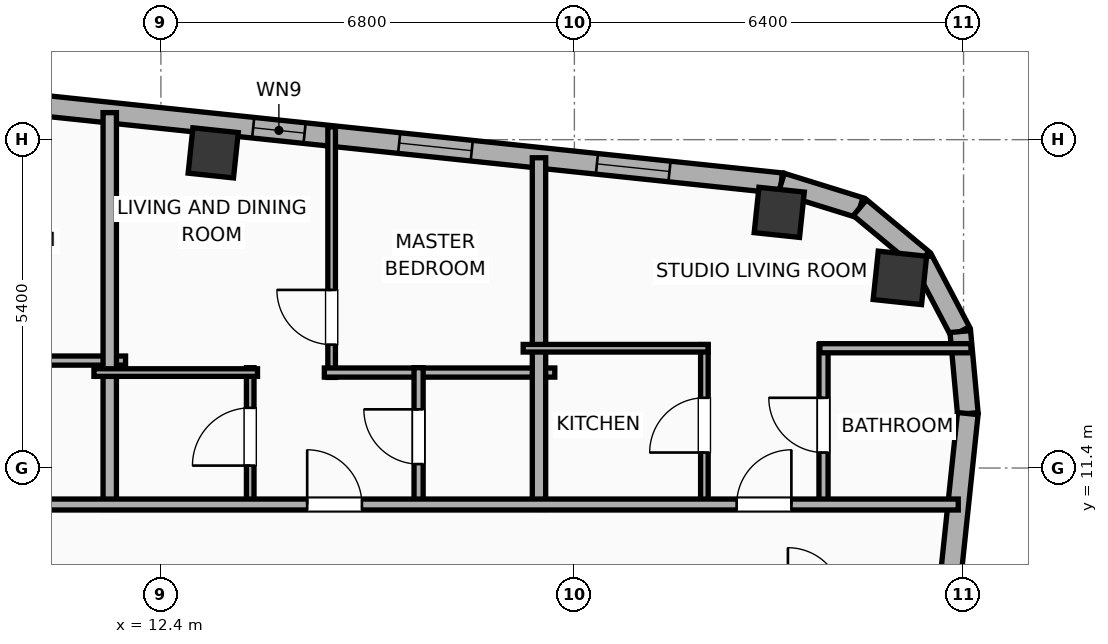
"""IFC4 building model, lengths in metres.
Left out: names, types, materials, properties, quantities, classifications, styles, units other than length and angle.
Written with IfcOpenShell. Run it as: python <this file> out.ifc"""

import sys

from ifc_helpers import new_model, si_unit, direction, frame, frame_2d, origin, origin_2d, place, context, subcontext, project, spatial, rectangle, hollow_rectangle, hollow_circle, extrude, element, fill, save


model = new_model("IFC4")
c1 = context("Model", 3, precision=1e-05, world=origin(), true_north=direction((0.0, 1.0)))
c2 = subcontext(c1, "Body", "Model", "MODEL_VIEW")
j1 = project(units=[si_unit("LENGTHUNIT", "METRE"), si_unit("PLANEANGLEUNIT", "RADIAN")], contexts=[c1])
p1 = place(None, origin())
s1 = spatial("IfcSite", under=j1, at=p1, CompositionType="ELEMENT")
p2 = place(p1, origin())
s2 = spatial("IfcBuilding", under=s1, at=p2, CompositionType="ELEMENT")
p3 = place(p2, frame((0.0, 0.0, 283.4)))
s3 = spatial("IfcBuildingStorey", under=s2, at=p3, CompositionType="ELEMENT", Elevation=283.4)
p4 = place(p3, frame((24.553, 14.527, 0.0), z_axis=(0.0, 0.0, 1.0), x_axis=(0.994521895368, -0.104528463268, 0.0)))
e1 = element("IfcColumn", 1, at=p4, inside=s3, PredefinedType="COLUMN", context=c2, shape_type="SweptSolid", body=[
    extrude(hollow_circle(Radius=0.4, WallThickness=0.028, at=origin_2d()), origin(), (0.0, 0.0, 1.0), 3.9),
])
for number, where, z_axis, x_axis in (
    (2, (22.569, 15.604, 0.0), (0.0, 0.0, 1.0), (0.995, -0.105, 0.0)),
    (3, (13.26, 16.583, 0.0), (0.0, 0.0, 1.0), (0.995, -0.105, 0.0)),
):
    element("IfcColumn", number, at=place(p3, frame(where, z_axis=z_axis, x_axis=x_axis)), inside=s3, PredefinedType="COLUMN", context=c2, shape_type="SweptSolid", body=[
        extrude(hollow_rectangle(XDim=0.75, YDim=0.75, WallThickness=0.025, at=origin_2d()), origin(), (0.0, 0.0, 1.0), 3.9),
    ])
p5 = place(p3, frame((-23.908, 20.972, 0.0), z_axis=(0.0, 0.0, 1.0), x_axis=(0.994521888554, -0.104528528102, 0.0)))
e4 = element("IfcWall", 4, at=p5, inside=s3, PredefinedType="ELEMENTEDWALL", context=c2, shape_type="SweptSolid", body=[
    extrude(rectangle(XDim=46.766, YDim=0.34, at=frame_2d((23.383, 0.0))), origin(), (0.0, 0.0, 1.0), 3.65),
])
p6 = place(p5, frame((23.833, 0.0, 0.75)))
e5 = element("IfcOpeningElement", 5, at=p6, cuts=e4, PredefinedType="OPENING", context=c2, shape_type="SweptSolid", body=[
    extrude(rectangle(XDim=2.4, YDim=2.1, at=frame_2d((1.2, 1.05))), frame((0.0, 0.18, 0.0), z_axis=(0.0, -1.0, 0.0), x_axis=(1.0, 0.0, 0.0)), (0.0, 0.0, 1.0), 0.36),
])
p7 = place(p5, frame((1.243, 0.0, 0.75)))
e6 = element("IfcOpeningElement", 6, at=p7, cuts=e4, PredefinedType="OPENING", context=c2, shape_type="SweptSolid", body=[
    extrude(rectangle(XDim=1.2, YDim=2.05, at=frame_2d((0.6, 1.025))), frame((0.0, 0.18, 0.0), z_axis=(0.0, -1.0, 0.0), x_axis=(1.0, 0.0, 0.0)), (0.0, 0.0, 1.0), 0.36),
])
p8 = place(p5, frame((4.157, 0.0, 0.75)))
e7 = element("IfcOpeningElement", 7, at=p8, cuts=e4, PredefinedType="OPENING", context=c2, shape_type="SweptSolid", body=[
    extrude(rectangle(XDim=1.2, YDim=2.05, at=frame_2d((0.6, 1.025))), frame((0.0, 0.18, 0.0), z_axis=(0.0, -1.0, 0.0), x_axis=(1.0, 0.0, 0.0)), (0.0, 0.0, 1.0), 0.36),
])
p9 = place(p5, frame((7.475, 0.0, 0.75)))
e8 = element("IfcOpeningElement", 8, at=p9, cuts=e4, PredefinedType="OPENING", context=c2, shape_type="SweptSolid", body=[
    extrude(rectangle(XDim=1.2, YDim=2.05, at=frame_2d((0.6, 1.025))), frame((0.0, 0.18, 0.0), z_axis=(0.0, -1.0, 0.0), x_axis=(1.0, 0.0, 0.0)), (0.0, 0.0, 1.0), 0.36),
])
p10 = place(p5, frame((11.513, 0.0, 0.75)))
e9 = element("IfcOpeningElement", 9, at=p10, cuts=e4, PredefinedType="OPENING", context=c2, shape_type="SweptSolid", body=[
    extrude(rectangle(XDim=1.2, YDim=2.05, at=frame_2d((0.6, 1.025))), frame((0.0, 0.18, 0.0), z_axis=(0.0, -1.0, 0.0), x_axis=(1.0, 0.0, 0.0)), (0.0, 0.0, 1.0), 0.36),
])
p11 = place(p5, frame((15.192, 0.0, 0.75)))
e10 = element("IfcOpeningElement", 10, at=p11, cuts=e4, PredefinedType="OPENING", context=c2, shape_type="SweptSolid", body=[
    extrude(rectangle(XDim=1.2, YDim=2.05, at=frame_2d((0.6, 1.025))), frame((0.0, 0.18, 0.0), z_axis=(0.0, -1.0, 0.0), x_axis=(1.0, 0.0, 0.0)), (0.0, 0.0, 1.0), 0.36),
])
p12 = place(p5, frame((19.671, 0.0, 0.75)))
e11 = element("IfcOpeningElement", 11, at=p12, cuts=e4, PredefinedType="OPENING", context=c2, shape_type="SweptSolid", body=[
    extrude(rectangle(XDim=1.2, YDim=2.05, at=frame_2d((0.6, 1.025))), frame((0.0, 0.18, 0.0), z_axis=(0.0, -1.0, 0.0), x_axis=(1.0, 0.0, 0.0)), (0.0, 0.0, 1.0), 0.36),
])
p13 = place(p5, frame((29.801, 0.0, 0.75)))
e12 = element("IfcOpeningElement", 12, at=p13, cuts=e4, PredefinedType="OPENING", context=c2, shape_type="SweptSolid", body=[
    extrude(rectangle(XDim=1.2, YDim=2.05, at=frame_2d((0.6, 1.025))), frame((0.0, 0.18, 0.0), z_axis=(0.0, -1.0, 0.0), x_axis=(1.0, 0.0, 0.0)), (0.0, 0.0, 1.0), 0.36),
])
p14 = place(p5, frame((33.35, 0.0, 0.75)))
e13 = element("IfcOpeningElement", 13, at=p14, cuts=e4, PredefinedType="OPENING", context=c2, shape_type="SweptSolid", body=[
    extrude(rectangle(XDim=1.2, YDim=2.05, at=frame_2d((0.6, 1.025))), frame((0.0, 0.18, 0.0), z_axis=(0.0, -1.0, 0.0), x_axis=(1.0, 0.0, 0.0)), (0.0, 0.0, 1.0), 0.36),
])
p15 = place(p5, frame((38.034, 0.0, 0.75)))
e14 = element("IfcOpeningElement", 14, at=p15, cuts=e4, PredefinedType="OPENING", context=c2, shape_type="SweptSolid", body=[
    extrude(rectangle(XDim=0.85, YDim=2.05, at=frame_2d((0.425, 1.025))), frame((0.0, 0.18, 0.0), z_axis=(0.0, -1.0, 0.0), x_axis=(1.0, 0.0, 0.0)), (0.0, 0.0, 1.0), 0.36),
])
p16 = place(p5, frame((40.448, 0.0, 0.75)))
e15 = element("IfcOpeningElement", 15, at=p16, cuts=e4, PredefinedType="OPENING", context=c2, shape_type="SweptSolid", body=[
    extrude(rectangle(XDim=1.2, YDim=2.05, at=frame_2d((0.6, 1.025))), frame((0.0, 0.18, 0.0), z_axis=(0.0, -1.0, 0.0), x_axis=(1.0, 0.0, 0.0)), (0.0, 0.0, 1.0), 0.36),
])
p17 = place(p5, frame((43.718, 0.0, 0.75)))
e16 = element("IfcOpeningElement", 16, at=p17, cuts=e4, PredefinedType="OPENING", context=c2, shape_type="SweptSolid", body=[
    extrude(rectangle(XDim=1.2, YDim=2.05, at=frame_2d((0.6, 1.025))), frame((0.0, 0.18, 0.0), z_axis=(0.0, -1.0, 0.0), x_axis=(1.0, 0.0, 0.0)), (0.0, 0.0, 1.0), 0.36),
])
p18 = place(p3, frame((22.603, 16.084, 0.0), z_axis=(0.0, 0.0, 1.0), x_axis=(0.955007802701, -0.296580674994, 0.0)))
e17 = element("IfcWall", 17, at=p18, inside=s3, PredefinedType="ELEMENTEDWALL", context=c2, shape_type="SweptSolid", body=[
    extrude(rectangle(XDim=1.354, YDim=0.34, at=frame_2d((0.677, 0.0))), origin(), (0.0, 0.0, 1.0), 3.65),
])
for number, where, z_axis, x_axis in (
    (18, (23.896, 15.682, 0.0), (0.0, 0.0, 1.0), (0.769, -0.64, 0.0)),
    (19, (24.924, 14.827, 0.0), (0.0, 0.0, 1.0), (0.466, -0.885, 0.0)),
):
    element("IfcWall", number, at=place(p3, frame(where, z_axis=z_axis, x_axis=x_axis)), inside=s3, PredefinedType="ELEMENTEDWALL", context=c2, shape_type="SweptSolid", body=[
        extrude(rectangle(XDim=1.337, YDim=0.34, at=frame_2d((0.668, 0.0))), origin(), (0.0, 0.0, 1.0), 3.65),
    ])
p19 = place(p3, frame((25.546, 13.644, 0.0), z_axis=(0.0, 0.0, 1.0), x_axis=(0.091592370975, -0.995796584438, 0.0)))
e20 = element("IfcWall", 20, at=p19, inside=s3, PredefinedType="ELEMENTEDWALL", context=c2, shape_type="SweptSolid", body=[
    extrude(rectangle(XDim=1.354, YDim=0.34, at=frame_2d((0.677, 0.0))), origin(), (0.0, 0.0, 1.0), 3.65),
])
p20 = place(p3, frame((25.67, 12.296, 0.0), z_axis=(0.0, 0.0, 1.0), x_axis=(-0.104533282919, -0.994521388791, 0.0)))
e21 = element("IfcWall", 21, at=p20, inside=s3, PredefinedType="ELEMENTEDWALL", context=c2, shape_type="SweptSolid", body=[
    extrude(rectangle(XDim=30.366, YDim=0.34, at=frame_2d((15.183, 0.0))), origin(), (0.0, 0.0, 1.0), 3.65),
])
p21 = place(p20, frame((5.842, 0.0, 0.75)))
e22 = element("IfcOpeningElement", 22, at=p21, cuts=e21, PredefinedType="OPENING", context=c2, shape_type="SweptSolid", body=[
    extrude(rectangle(XDim=1.8, YDim=2.1, at=frame_2d((0.9, 1.05))), frame((0.0, 0.18, 0.0), z_axis=(0.0, -1.0, 0.0), x_axis=(1.0, 0.0, 0.0)), (0.0, 0.0, 1.0), 0.36),
])
p22 = place(p20, frame((23.525, 0.0, 0.75)))
e23 = element("IfcOpeningElement", 23, at=p22, cuts=e21, PredefinedType="OPENING", context=c2, shape_type="SweptSolid", body=[
    extrude(rectangle(XDim=1.8, YDim=2.1, at=frame_2d((0.9, 1.05))), frame((0.0, 0.18, 0.0), z_axis=(0.0, -1.0, 0.0), x_axis=(1.0, 0.0, 0.0)), (0.0, 0.0, 1.0), 0.36),
])
p23 = place(p20, frame((27.368, 0.0, 0.75)))
e24 = element("IfcOpeningElement", 24, at=p23, cuts=e21, PredefinedType="OPENING", context=c2, shape_type="SweptSolid", body=[
    extrude(rectangle(XDim=1.2, YDim=2.05, at=frame_2d((0.6, 1.025))), frame((0.0, 0.18, 0.0), z_axis=(0.0, -1.0, 0.0), x_axis=(1.0, 0.0, 0.0)), (0.0, 0.0, 1.0), 0.36),
])
p24 = place(p20, frame((18.181, 0.0, 0.75)))
e25 = element("IfcOpeningElement", 25, at=p24, cuts=e21, PredefinedType="OPENING", context=c2, shape_type="SweptSolid", body=[
    extrude(rectangle(XDim=1.2, YDim=2.05, at=frame_2d((0.6, 1.025))), frame((0.0, 0.18, 0.0), z_axis=(0.0, -1.0, 0.0), x_axis=(1.0, 0.0, 0.0)), (0.0, 0.0, 1.0), 0.36),
])
p25 = place(p3, frame((8.029, 13.167, 0.0), z_axis=(0.0, 0.0, 1.0), x_axis=(1.0, 0.0, 0.0)))
e26 = element("IfcWall", 26, at=p25, inside=s3, PredefinedType="PLUMBINGWALL", context=c2, shape_type="SweptSolid", body=[
    extrude(rectangle(XDim=3.79, YDim=0.15, at=frame_2d((1.895, 0.0))), origin(), (0.0, 0.0, 1.0), 3.65),
])
p26 = place(p3, frame((11.559, 10.72, 0.0), z_axis=(0.0, 0.0, 1.0), x_axis=(0.0, 1.0, 0.0)))
e27 = element("IfcWall", 27, at=p26, inside=s3, PredefinedType="PARTITIONING", context=c2, shape_type="SweptSolid", body=[
    extrude(rectangle(XDim=6.524, YDim=0.22, at=frame_2d((3.262, 0.0))), origin(), (0.0, 0.0, 1.0), 3.65),
])
p27 = place(p3, frame((15.208, 12.89, 0.0), z_axis=(0.0, 0.0, 1.0), x_axis=(0.0, 1.0, 0.0)))
e28 = element("IfcWall", 28, at=p27, inside=s3, PredefinedType="PARTITIONING", context=c2, shape_type="SweptSolid", body=[
    extrude(rectangle(XDim=4.122, YDim=0.125, at=frame_2d((2.061, 0.0))), origin(), (0.0, 0.0, 1.0), 3.65),
])
p28 = place(p27, frame((0.539, 0.0, 0.0)))
e29 = element("IfcOpeningElement", 29, at=p28, cuts=e28, PredefinedType="OPENING", context=c2, shape_type="SweptSolid", body=[
    extrude(rectangle(XDim=0.9, YDim=2.05, at=frame_2d((0.45, 1.025))), frame((0.0, 0.073, 0.0), z_axis=(0.0, -1.0, 0.0), x_axis=(1.0, 0.0, 0.0)), (0.0, 0.0, 1.0), 0.145),
])
p29 = place(p3, frame((15.088, 12.97, 0.0), z_axis=(0.0, 0.0, 1.0), x_axis=(1.0, 0.0, 0.0)))
e30 = element("IfcWall", 30, at=p29, inside=s3, PredefinedType="PLUMBINGWALL", context=c2, shape_type="SweptSolid", body=[
    extrude(rectangle(XDim=3.79, YDim=0.15, at=frame_2d((1.895, 0.0))), origin(), (0.0, 0.0, 1.0), 3.65),
])
p30 = place(p3, frame((13.869, 10.78, 0.0), z_axis=(0.0, 0.0, 1.0), x_axis=(0.0, 1.0, 0.0)))
e31 = element("IfcWall", 31, at=p30, inside=s3, PredefinedType="PARTITIONING", context=c2, shape_type="SweptSolid", body=[
    extrude(rectangle(XDim=2.27, YDim=0.125, at=frame_2d((1.135, 0.0))), origin(), (0.0, 0.0, 1.0), 3.65),
])
p31 = place(p30, frame((0.66, 0.0, 0.0)))
e32 = element("IfcOpeningElement", 32, at=p31, cuts=e31, PredefinedType="OPENING", context=c2, shape_type="SweptSolid", body=[
    extrude(rectangle(XDim=0.95, YDim=2.05, at=frame_2d((0.475, 1.025))), frame((0.0, 0.073, 0.0), z_axis=(0.0, -1.0, 0.0), x_axis=(1.0, 0.0, 0.0)), (0.0, 0.0, 1.0), 0.145),
])
p32 = place(p3, frame((11.299, 12.97, 0.0), z_axis=(0.0, 0.0, 1.0), x_axis=(1.0, 0.0, 0.0)))
e33 = element("IfcWall", 33, at=p32, inside=s3, PredefinedType="PARTITIONING", context=c2, shape_type="SweptSolid", body=[
    extrude(rectangle(XDim=2.69, YDim=0.125, at=frame_2d((1.345, 0.0))), origin(), (0.0, 0.0, 1.0), 3.65),
])
p33 = place(p3, frame((16.638, 10.78, 0.0), z_axis=(0.0, 0.0, 1.0), x_axis=(0.0, 1.0, 0.0)))
e34 = element("IfcWall", 34, at=p33, inside=s3, PredefinedType="PLUMBINGWALL", context=c2, shape_type="SweptSolid", body=[
    extrude(rectangle(XDim=2.27, YDim=0.15, at=frame_2d((1.135, 0.0))), origin(), (0.0, 0.0, 1.0), 3.65),
])
p34 = place(p33, frame((0.685, 0.0, 0.0)))
e35 = element("IfcOpeningElement", 35, at=p34, cuts=e34, PredefinedType="OPENING", context=c2, shape_type="SweptSolid", body=[
    extrude(rectangle(XDim=0.9, YDim=2.05, at=frame_2d((0.45, 1.025))), frame((0.0, 0.085, 0.0), z_axis=(0.0, -1.0, 0.0), x_axis=(1.0, 0.0, 0.0)), (0.0, 0.0, 1.0), 0.17),
])
p35 = place(p3, frame((18.618, 10.72, 0.0), z_axis=(0.0, 0.0, 1.0), x_axis=(0.0, 1.0, 0.0)))
e36 = element("IfcWall", 36, at=p35, inside=s3, PredefinedType="PARTITIONING", context=c2, shape_type="SweptSolid", body=[
    extrude(rectangle(XDim=5.782, YDim=0.22, at=frame_2d((2.891, 0.0))), origin(), (0.0, 0.0, 1.0), 3.65),
])
p36 = place(p3, frame((21.338, 10.78, 0.0), z_axis=(0.0, 0.0, 1.0), x_axis=(0.0, 1.0, 0.0)))
e37 = element("IfcWall", 37, at=p36, inside=s3, PredefinedType="PARTITIONING", context=c2, shape_type="SweptSolid", body=[
    extrude(rectangle(XDim=2.65, YDim=0.125, at=frame_2d((1.325, 0.0))), origin(), (0.0, 0.0, 1.0), 3.09),
])
p37 = place(p36, frame((0.875, 0.0, 0.0)))
e38 = element("IfcOpeningElement", 38, at=p37, cuts=e37, PredefinedType="OPENING", context=c2, shape_type="SweptSolid", body=[
    extrude(rectangle(XDim=0.9, YDim=2.05, at=frame_2d((0.45, 1.025))), frame((0.0, 0.073, 0.0), z_axis=(0.0, -1.0, 0.0), x_axis=(1.0, 0.0, 0.0)), (0.0, 0.0, 1.0), 0.145),
])
p38 = place(p3, frame((23.297, 10.78, 0.0), z_axis=(0.0, 0.0, 1.0), x_axis=(0.0, 1.0, 0.0)))
e39 = element("IfcWall", 39, at=p38, inside=s3, PredefinedType="PLUMBINGWALL", context=c2, shape_type="SweptSolid", body=[
    extrude(rectangle(XDim=2.65, YDim=0.15, at=frame_2d((1.325, 0.0))), origin(), (0.0, 0.0, 1.0), 3.65),
])
p39 = place(p38, frame((0.875, 0.0, 0.0)))
e40 = element("IfcOpeningElement", 40, at=p39, cuts=e39, PredefinedType="OPENING", context=c2, shape_type="SweptSolid", body=[
    extrude(rectangle(XDim=0.9, YDim=2.05, at=frame_2d((0.45, 1.025))), frame((0.0, 0.085, 0.0), z_axis=(0.0, -1.0, 0.0), x_axis=(1.0, 0.0, 0.0)), (0.0, 0.0, 1.0), 0.17),
])
p40 = place(p3, frame((18.358, 13.37, 0.0), z_axis=(0.0, 0.0, 1.0), x_axis=(1.0, 0.0, 0.0)))
e41 = element("IfcWall", 41, at=p40, inside=s3, PredefinedType="PARTITIONING", context=c2, shape_type="SweptSolid", body=[
    extrude(rectangle(XDim=3.04, YDim=0.125, at=frame_2d((1.52, 0.0))), origin(), (0.0, 0.0, 1.0), 3.65),
])
p41 = place(p3, frame((23.237, 13.37, 0.0), z_axis=(0.0, 0.0, 1.0), x_axis=(1.0, 0.0, 0.0)))
e42 = element("IfcWall", 42, at=p41, inside=s3, PredefinedType="PLUMBINGWALL", context=c2, shape_type="SweptSolid", body=[
    extrude(rectangle(XDim=2.485, YDim=0.15, at=frame_2d((1.242, 0.0))), origin(), (0.0, 0.0, 1.0), 3.65),
])
p42 = place(p3, frame((-28.443, 10.8, 0.0), z_axis=(0.0, 0.0, 1.0), x_axis=(1.0, 0.0, 0.0)))
e43 = element("IfcWall", 43, at=p42, inside=s3, PredefinedType="PARTITIONING", context=c2, shape_type="SweptSolid", body=[
    extrude(rectangle(XDim=53.956, YDim=0.18, at=frame_2d((26.978, 0.0))), origin(), (0.0, 0.0, 1.0), 3.65),
])
p43 = place(p42, frame((3.213, 0.0, 0.0)))
e44 = element("IfcOpeningElement", 44, at=p43, cuts=e43, PredefinedType="OPENING", context=c2, shape_type="SweptSolid", body=[
    extrude(rectangle(XDim=1.15, YDim=2.05, at=frame_2d((0.575, 1.025))), frame((0.0, 0.1, 0.0), z_axis=(0.0, -1.0, 0.0), x_axis=(1.0, 0.0, 0.0)), (0.0, 0.0, 1.0), 0.2),
])
p44 = place(p42, frame((10.556, 0.0, 0.0)))
e45 = element("IfcOpeningElement", 45, at=p44, cuts=e43, PredefinedType="OPENING", context=c2, shape_type="SweptSolid", body=[
    extrude(rectangle(XDim=1.15, YDim=2.05, at=frame_2d((0.575, 1.025))), frame((0.0, 0.1, 0.0), z_axis=(0.0, -1.0, 0.0), x_axis=(1.0, 0.0, 0.0)), (0.0, 0.0, 1.0), 0.2),
])
p45 = place(p42, frame((17.872, 0.0, 0.0)))
e46 = element("IfcOpeningElement", 46, at=p45, cuts=e43, PredefinedType="OPENING", context=c2, shape_type="SweptSolid", body=[
    extrude(rectangle(XDim=1.15, YDim=2.05, at=frame_2d((0.575, 1.025))), frame((0.0, 0.1, 0.0), z_axis=(0.0, -1.0, 0.0), x_axis=(1.0, 0.0, 0.0)), (0.0, 0.0, 1.0), 0.2),
])
p46 = place(p42, frame((24.45, 0.0, 0.0)))
e47 = element("IfcOpeningElement", 47, at=p46, cuts=e43, PredefinedType="OPENING", context=c2, shape_type="SweptSolid", body=[
    extrude(rectangle(XDim=0.9, YDim=2.05, at=frame_2d((0.45, 1.025))), frame((0.0, 0.1, 0.0), z_axis=(0.0, -1.0, 0.0), x_axis=(1.0, 0.0, 0.0)), (0.0, 0.0, 1.0), 0.2),
])
p47 = place(p42, frame((29.954, 0.0, 0.0)))
e48 = element("IfcOpeningElement", 48, at=p47, cuts=e43, PredefinedType="OPENING", context=c2, shape_type="SweptSolid", body=[
    extrude(rectangle(XDim=0.9, YDim=2.05, at=frame_2d((0.45, 1.025))), frame((0.0, 0.1, 0.0), z_axis=(0.0, -1.0, 0.0), x_axis=(1.0, 0.0, 0.0)), (0.0, 0.0, 1.0), 0.2),
])
p48 = place(p42, frame((36.186, 0.0, 0.0)))
e49 = element("IfcOpeningElement", 49, at=p48, cuts=e43, PredefinedType="OPENING", context=c2, shape_type="SweptSolid", body=[
    extrude(rectangle(XDim=0.9, YDim=2.05, at=frame_2d((0.45, 1.025))), frame((0.0, 0.1, 0.0), z_axis=(0.0, -1.0, 0.0), x_axis=(1.0, 0.0, 0.0)), (0.0, 0.0, 1.0), 0.2),
])
p49 = place(p42, frame((43.249, 0.0, 0.0)))
e50 = element("IfcOpeningElement", 50, at=p49, cuts=e43, PredefinedType="OPENING", context=c2, shape_type="SweptSolid", body=[
    extrude(rectangle(XDim=0.9, YDim=2.05, at=frame_2d((0.45, 1.025))), frame((0.0, 0.1, 0.0), z_axis=(0.0, -1.0, 0.0), x_axis=(1.0, 0.0, 0.0)), (0.0, 0.0, 1.0), 0.2),
])
p50 = place(p42, frame((50.311, 0.0, 0.0)))
e51 = element("IfcOpeningElement", 51, at=p50, cuts=e43, PredefinedType="OPENING", context=c2, shape_type="SweptSolid", body=[
    extrude(rectangle(XDim=0.9, YDim=2.05, at=frame_2d((0.45, 1.025))), frame((0.0, 0.1, 0.0), z_axis=(0.0, -1.0, 0.0), x_axis=(1.0, 0.0, 0.0)), (0.0, 0.0, 1.0), 0.2),
])
p51 = place(p15, origin())
e52 = element("IfcWindow", 52, at=p51, inside=s3, PartitioningType="SINGLE_PANEL", PredefinedType="WINDOW", context=c2, shape_type="SweptSolid", body=[
    extrude(rectangle(XDim=0.85, YDim=2.05, at=frame_2d((0.425, 1.025))), frame((0.0, 0.03, 0.0), z_axis=(0.0, -1.0, 0.0), x_axis=(1.0, 0.0, 0.0)), (0.0, 0.0, 1.0), 0.06),
])
fill(e14, e52)
p52 = place(p16, origin())
e53 = element("IfcWindow", 53, at=p52, inside=s3, PartitioningType="SINGLE_PANEL", PredefinedType="WINDOW", context=c2, shape_type="SweptSolid", body=[
    extrude(rectangle(XDim=1.2, YDim=2.05, at=frame_2d((0.6, 1.025))), frame((0.0, 0.03, 0.0), z_axis=(0.0, -1.0, 0.0), x_axis=(1.0, 0.0, 0.0)), (0.0, 0.0, 1.0), 0.06),
])
fill(e15, e53)
p53 = place(p17, origin())
e54 = element("IfcWindow", 54, at=p53, inside=s3, PartitioningType="SINGLE_PANEL", PredefinedType="WINDOW", context=c2, shape_type="SweptSolid", body=[
    extrude(rectangle(XDim=1.2, YDim=2.05, at=frame_2d((0.6, 1.025))), frame((0.0, 0.03, 0.0), z_axis=(0.0, -1.0, 0.0), x_axis=(1.0, 0.0, 0.0)), (0.0, 0.0, 1.0), 0.06),
])
fill(e16, e54)
p54 = place(p28, origin())
e55 = element("IfcDoor", 55, at=p54, inside=s3, OperationType="SINGLE_SWING_RIGHT", PredefinedType="DOOR", context=c2, shape_type="SweptSolid", body=[
    extrude(rectangle(XDim=0.9, YDim=2.05, at=frame_2d((0.45, 1.025))), frame((0.0, 0.025, 0.0), z_axis=(0.0, -1.0, 0.0), x_axis=(1.0, 0.0, 0.0)), (0.0, 0.0, 1.0), 0.05),
])
fill(e29, e55)
p55 = place(p31, origin())
e56 = element("IfcDoor", 56, at=p55, inside=s3, OperationType="SINGLE_SWING_LEFT", PredefinedType="DOOR", context=c2, shape_type="SweptSolid", body=[
    extrude(rectangle(XDim=0.95, YDim=2.05, at=frame_2d((0.475, 1.025))), frame((0.0, 0.025, 0.0), z_axis=(0.0, -1.0, 0.0), x_axis=(1.0, 0.0, 0.0)), (0.0, 0.0, 1.0), 0.05),
])
fill(e32, e56)
p56 = place(p34, origin())
e57 = element("IfcDoor", 57, at=p56, inside=s3, OperationType="SINGLE_SWING_RIGHT", PredefinedType="DOOR", context=c2, shape_type="SweptSolid", body=[
    extrude(rectangle(XDim=0.9, YDim=2.05, at=frame_2d((0.45, 1.025))), frame((0.0, 0.025, 0.0), z_axis=(0.0, -1.0, 0.0), x_axis=(1.0, 0.0, 0.0)), (0.0, 0.0, 1.0), 0.05),
])
fill(e35, e57)
p57 = place(p37, origin())
e58 = element("IfcDoor", 58, at=p57, inside=s3, OperationType="SINGLE_SWING_LEFT", PredefinedType="DOOR", context=c2, shape_type="SweptSolid", body=[
    extrude(rectangle(XDim=0.9, YDim=2.05, at=frame_2d((0.45, 1.025))), frame((0.0, 0.025, 0.0), z_axis=(0.0, -1.0, 0.0), x_axis=(1.0, 0.0, 0.0)), (0.0, 0.0, 1.0), 0.05),
])
fill(e38, e58)
p58 = place(p39, origin())
e59 = element("IfcDoor", 59, at=p58, inside=s3, OperationType="SINGLE_SWING_RIGHT", PredefinedType="DOOR", context=c2, shape_type="SweptSolid", body=[
    extrude(rectangle(XDim=0.9, YDim=2.05, at=frame_2d((0.45, 1.025))), frame((0.0, 0.025, 0.0), z_axis=(0.0, -1.0, 0.0), x_axis=(1.0, 0.0, 0.0)), (0.0, 0.0, 1.0), 0.05),
])
fill(e40, e59)
p59 = place(p49, origin())
e60 = element("IfcDoor", 60, at=p59, inside=s3, OperationType="SINGLE_SWING_LEFT", PredefinedType="DOOR", context=c2, shape_type="SweptSolid", body=[
    extrude(rectangle(XDim=0.9, YDim=2.05, at=frame_2d((0.45, 1.025))), frame((0.0, 0.025, 0.0), z_axis=(0.0, -1.0, 0.0), x_axis=(1.0, 0.0, 0.0)), (0.0, 0.0, 1.0), 0.05),
])
fill(e50, e60)
p60 = place(p50, origin())
e61 = element("IfcDoor", 61, at=p60, inside=s3, OperationType="SINGLE_SWING_RIGHT", PredefinedType="DOOR", context=c2, shape_type="SweptSolid", body=[
    extrude(rectangle(XDim=0.9, YDim=2.05, at=frame_2d((0.45, 1.025))), frame((0.0, 0.025, 0.0), z_axis=(0.0, -1.0, 0.0), x_axis=(1.0, 0.0, 0.0)), (0.0, 0.0, 1.0), 0.05),
])
fill(e51, e61)
save(model, sys.argv[1])
